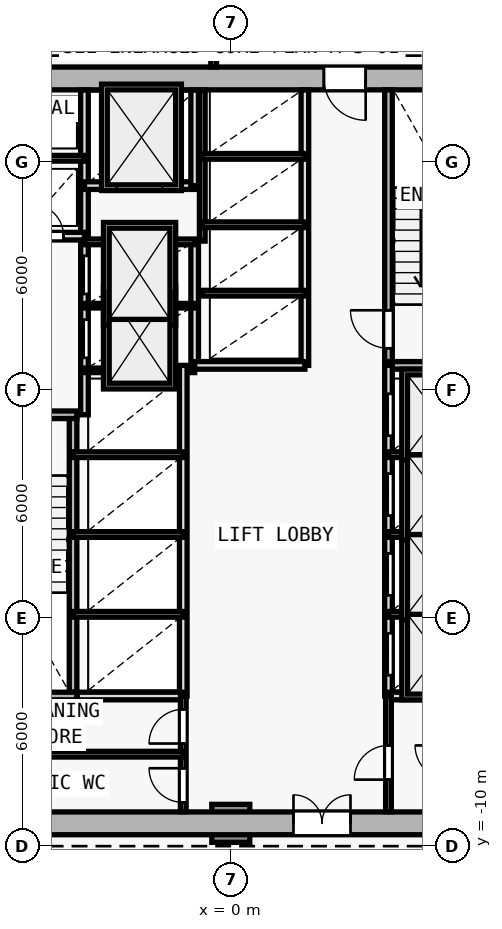
"""IFC4 building model, lengths in metres.
Left out: names, types, materials, properties, quantities, classifications, styles, units other than length and angle.
Written with IfcOpenShell. Run it as: python <this file> out.ifc"""

import sys

from ifc_helpers import new_model, si_unit, direction, frame, frame_2d, origin, origin_2d, place, context, subcontext, project, spatial, rectangle, extrude, element, fill, save


model = new_model("IFC4")
c1 = context("Model", 3, precision=1e-05, world=origin(), true_north=direction((0.0, 1.0)))
c2 = subcontext(c1, "Body", "Model", "MODEL_VIEW")
j1 = project(units=[si_unit("LENGTHUNIT", "METRE"), si_unit("PLANEANGLEUNIT", "RADIAN")], contexts=[c1])
p1 = place(None, origin())
s1 = spatial("IfcSite", under=j1, at=p1, CompositionType="ELEMENT")
p2 = place(p1, origin())
s2 = spatial("IfcBuilding", under=s1, at=p2, CompositionType="ELEMENT")
p3 = place(p2, frame((0.0, 0.0, 9.2)))
s3 = spatial("IfcBuildingStorey", under=s2, at=p3, CompositionType="ELEMENT", Elevation=9.2)
p4 = place(p3, frame((0.0, -9.4, 0.0), z_axis=(0.0, 0.0, 1.0), x_axis=(1.0, 0.0, 0.0)))
e1 = element("IfcColumn", 1, at=p4, inside=s3, PredefinedType="COLUMN", context=c2, shape_type="SweptSolid", body=[
    extrude(rectangle(XDim=1.0, YDim=1.0, at=origin_2d()), origin(), (0.0, 0.0, 1.0), 4.2),
])
p5 = place(p3, frame((-8.0, -9.4, 0.0), z_axis=(0.0, 0.0, 1.0), x_axis=(1.0, 0.0, 0.0)))
e2 = element("IfcWall", 2, at=p5, inside=s3, PredefinedType="SHEAR", context=c2, shape_type="SweptSolid", body=[
    extrude(rectangle(XDim=16.0, YDim=0.6, at=frame_2d((8.0, 0.0))), origin(), (0.0, 0.0, 1.0), 3.92),
])
p6 = place(p5, frame((9.65, 0.0, 0.0)))
e3 = element("IfcOpeningElement", 3, at=p6, cuts=e2, PredefinedType="OPENING", context=c2, shape_type="SweptSolid", body=[
    extrude(rectangle(XDim=1.5, YDim=2.2, at=frame_2d((0.75, 1.1))), frame((0.0, 0.31, 0.0), z_axis=(0.0, -1.0, 0.0), x_axis=(1.0, 0.0, 0.0)), (0.0, 0.0, 1.0), 0.62),
])
p7 = place(p3, frame((8.0, 10.2, 0.0), z_axis=(0.0, 0.0, 1.0), x_axis=(-1.0, 0.0, 0.0)))
e4 = element("IfcWall", 4, at=p7, inside=s3, PredefinedType="SHEAR", context=c2, shape_type="SweptSolid", body=[
    extrude(rectangle(XDim=16.0, YDim=0.6, at=frame_2d((8.0, 0.0))), origin(), (0.0, 0.0, 1.0), 3.92),
])
p8 = place(p7, frame((4.45, 0.0, 0.0)))
e5 = element("IfcOpeningElement", 5, at=p8, cuts=e4, PredefinedType="OPENING", context=c2, shape_type="SweptSolid", body=[
    extrude(rectangle(XDim=1.1, YDim=2.15, at=frame_2d((0.55, 1.075))), frame((0.0, 0.31, 0.0), z_axis=(0.0, -1.0, 0.0), x_axis=(1.0, 0.0, 0.0)), (0.0, 0.0, 1.0), 0.62),
])
p9 = place(p3, frame((-7.4, 1.35, 0.0), z_axis=(0.0, 0.0, 1.0), x_axis=(1.0, 0.0, 0.0)))
e6 = element("IfcWall", 6, at=p9, inside=s3, PredefinedType="SOLIDWALL", context=c2, shape_type="SweptSolid", body=[
    extrude(rectangle(XDim=3.35, YDim=0.2, at=frame_2d((1.675, 0.0))), origin(), (0.0, 0.0, 1.0), 3.92),
])
p10 = place(p9, frame((0.65, 0.0, 0.0)))
e7 = element("IfcOpeningElement", 7, at=p10, cuts=e6, PredefinedType="OPENING", context=c2, shape_type="SweptSolid", body=[
    extrude(rectangle(XDim=1.0, YDim=2.15, at=frame_2d((0.5, 1.075))), frame((0.0, 0.11, 0.0), z_axis=(0.0, -1.0, 0.0), x_axis=(1.0, 0.0, 0.0)), (0.0, 0.0, 1.0), 0.22),
])
p11 = place(p3, frame((-4.15, -5.95, 0.0), z_axis=(0.0, 0.0, 1.0), x_axis=(0.0, 1.0, 0.0)))
e8 = element("IfcWall", 8, at=p11, inside=s3, PredefinedType="SOLIDWALL", context=c2, shape_type="SweptSolid", body=[
    extrude(rectangle(XDim=7.2, YDim=0.2, at=frame_2d((3.6, 0.0))), origin(), (0.0, 0.0, 1.0), 3.92),
])
p12 = place(p3, frame((-3.85, 1.35, 0.0), z_axis=(0.0, 0.0, 1.0), x_axis=(0.0, 1.0, 0.0)))
e9 = element("IfcWall", 9, at=p12, inside=s3, PredefinedType="SOLIDWALL", context=c2, shape_type="SweptSolid", body=[
    extrude(rectangle(XDim=8.545, YDim=0.2, at=frame_2d((4.272, 0.0))), origin(), (0.0, 0.0, 1.0), 3.92),
])
p13 = place(p12, frame((1.5, 0.0, 0.0)))
e10 = element("IfcOpeningElement", 10, at=p13, cuts=e9, PredefinedType="OPENING", context=c2, shape_type="SweptSolid", body=[
    extrude(rectangle(XDim=1.0, YDim=2.15, at=frame_2d((0.5, 1.075))), frame((0.0, 0.11, 0.0), z_axis=(0.0, -1.0, 0.0), x_axis=(1.0, 0.0, 0.0)), (0.0, 0.0, 1.0), 0.22),
])
p14 = place(p12, frame((3.18, 0.0, 0.0)))
e11 = element("IfcOpeningElement", 11, at=p14, cuts=e9, PredefinedType="OPENING", context=c2, shape_type="SweptSolid", body=[
    extrude(rectangle(XDim=1.0, YDim=2.15, at=frame_2d((0.5, 1.075))), frame((0.0, 0.11, 0.0), z_axis=(0.0, -1.0, 0.0), x_axis=(1.0, 0.0, 0.0)), (0.0, 0.0, 1.0), 0.22),
])
p15 = place(p3, frame((-7.395, 6.05, 0.0), z_axis=(0.0, 0.0, 1.0), x_axis=(1.0, 0.0, 0.0)))
e12 = element("IfcWall", 12, at=p15, inside=s3, PredefinedType="SOLIDWALL", context=c2, shape_type="SweptSolid", body=[
    extrude(rectangle(XDim=3.545, YDim=0.2, at=frame_2d((1.772, 0.0))), origin(), (0.0, 0.0, 1.0), 3.92),
])
p16 = place(p15, frame((0.345, 0.0, 0.0)))
e13 = element("IfcOpeningElement", 13, at=p16, cuts=e12, PredefinedType="OPENING", context=c2, shape_type="SweptSolid", body=[
    extrude(rectangle(XDim=0.85, YDim=2.1, at=frame_2d((0.425, 1.05))), frame((0.0, 0.11, 0.0), z_axis=(0.0, -1.0, 0.0), x_axis=(1.0, 0.0, 0.0)), (0.0, 0.0, 1.0), 0.22),
])
p17 = place(p15, frame((2.145, 0.0, 0.0)))
e14 = element("IfcOpeningElement", 14, at=p17, cuts=e12, PredefinedType="OPENING", context=c2, shape_type="SweptSolid", body=[
    extrude(rectangle(XDim=0.85, YDim=2.1, at=frame_2d((0.425, 1.05))), frame((0.0, 0.11, 0.0), z_axis=(0.0, -1.0, 0.0), x_axis=(1.0, 0.0, 0.0)), (0.0, 0.0, 1.0), 0.22),
])
p18 = place(p3, frame((-7.395, 8.1, 0.0), z_axis=(0.0, 0.0, 1.0), x_axis=(1.0, 0.0, 0.0)))
e15 = element("IfcWall", 15, at=p18, inside=s3, PredefinedType="PARTITIONING", context=c2, shape_type="SweptSolid", body=[
    extrude(rectangle(XDim=3.545, YDim=0.15, at=frame_2d((1.772, 0.0))), origin(), (0.0, 0.0, 1.0), 3.92),
])
p19 = place(p3, frame((4.15, 2.75, 0.0), z_axis=(0.0, 0.0, 1.0), x_axis=(0.0, 1.0, 0.0)))
e16 = element("IfcWall", 16, at=p19, inside=s3, PredefinedType="SOLIDWALL", context=c2, shape_type="SweptSolid", body=[
    extrude(rectangle(XDim=7.15, YDim=0.2, at=frame_2d((3.575, 0.0))), origin(), (0.0, 0.0, 1.0), 3.92),
])
p20 = place(p19, frame((0.35, 0.0, 0.0)))
e17 = element("IfcOpeningElement", 17, at=p20, cuts=e16, PredefinedType="OPENING", context=c2, shape_type="SweptSolid", body=[
    extrude(rectangle(XDim=1.0, YDim=2.15, at=frame_2d((0.5, 1.075))), frame((0.0, 0.11, 0.0), z_axis=(0.0, -1.0, 0.0), x_axis=(1.0, 0.0, 0.0)), (0.0, 0.0, 1.0), 0.22),
])
p21 = place(p3, frame((4.05, 2.65, 0.0), z_axis=(0.0, 0.0, 1.0), x_axis=(1.0, 0.0, 0.0)))
e18 = element("IfcWall", 18, at=p21, inside=s3, PredefinedType="SOLIDWALL", context=c2, shape_type="SweptSolid", body=[
    extrude(rectangle(XDim=3.35, YDim=0.2, at=frame_2d((1.675, 0.0))), origin(), (0.0, 0.0, 1.0), 3.92),
])
p22 = place(p3, frame((-0.95, 2.65, 0.0), z_axis=(0.0, 0.0, 1.0), x_axis=(0.0, 1.0, 0.0)))
e19 = element("IfcWall", 19, at=p22, inside=s3, PredefinedType="SOLIDWALL", context=c2, shape_type="SweptSolid", body=[
    extrude(rectangle(XDim=3.27, YDim=0.2, at=frame_2d((1.635, 0.0))), origin(), (0.0, 0.0, 1.0), 3.92),
])
for number, where, z_axis, x_axis in (
    (20, (-3.85, 2.52, 0.0), (0.0, 0.0, 1.0), (1.0, 0.0, 0.0)),
    (21, (-3.85, 4.22, 0.0), (0.0, 0.0, 1.0), (1.0, 0.0, 0.0)),
):
    element("IfcWall", number, at=place(p3, frame(where, z_axis=z_axis, x_axis=x_axis)), inside=s3, PredefinedType="PARTITIONING", context=c2, shape_type="SweptSolid", body=[
        extrude(rectangle(XDim=2.9, YDim=0.12, at=frame_2d((1.45, 0.0))), origin(), (0.0, 0.0, 1.0), 3.92),
    ])
p23 = place(p3, frame((-3.85, 5.9, 0.0), z_axis=(0.0, 0.0, 1.0), x_axis=(1.0, 0.0, 0.0)))
e22 = element("IfcWall", 22, at=p23, inside=s3, PredefinedType="PARTITIONING", context=c2, shape_type="SweptSolid", body=[
    extrude(rectangle(XDim=2.9, YDim=0.15, at=frame_2d((1.45, 0.0))), origin(), (0.0, 0.0, 1.0), 3.92),
])
p24 = place(p3, frame((-3.85, 7.38, 0.0), z_axis=(0.0, 0.0, 1.0), x_axis=(1.0, 0.0, 0.0)))
e23 = element("IfcWall", 23, at=p24, inside=s3, PredefinedType="SOLIDWALL", context=c2, shape_type="SweptSolid", body=[
    extrude(rectangle(XDim=2.9, YDim=0.2, at=frame_2d((1.45, 0.0))), origin(), (0.0, 0.0, 1.0), 3.92),
])
p25 = place(p24, frame((0.85, 0.0, 0.0)))
e24 = element("IfcOpeningElement", 24, at=p25, cuts=e23, PredefinedType="OPENING", context=c2, shape_type="SweptSolid", body=[
    extrude(rectangle(XDim=1.2, YDim=2.2, at=frame_2d((0.6, 1.1))), frame((0.0, 0.11, 0.0), z_axis=(0.0, -1.0, 0.0), x_axis=(1.0, 0.0, 0.0)), (0.0, 0.0, 1.0), 0.22),
])
p26 = place(p3, frame((-0.95, 7.38, 0.0), z_axis=(0.0, 0.0, 1.0), x_axis=(0.0, 1.0, 0.0)))
e25 = element("IfcWall", 25, at=p26, inside=s3, PredefinedType="SOLIDWALL", context=c2, shape_type="SweptSolid", body=[
    extrude(rectangle(XDim=2.515, YDim=0.2, at=frame_2d((1.258, 0.0))), origin(), (0.0, 0.0, 1.0), 3.92),
])
p27 = place(p3, frame((4.15, -6.05, 0.0), z_axis=(0.0, 0.0, 1.0), x_axis=(0.0, 1.0, 0.0)))
e26 = element("IfcWall", 26, at=p27, inside=s3, PredefinedType="SOLIDWALL", context=c2, shape_type="SweptSolid", body=[
    extrude(rectangle(XDim=8.7, YDim=0.2, at=frame_2d((4.35, 0.0))), origin(), (0.0, 0.0, 1.0), 3.92),
])
p28 = place(p27, frame((0.55, 0.0, 0.0)))
e27 = element("IfcOpeningElement", 27, at=p28, cuts=e26, PredefinedType="OPENING", context=c2, shape_type="SweptSolid", body=[
    extrude(rectangle(XDim=1.1, YDim=2.15, at=frame_2d((0.55, 1.075))), frame((0.0, 0.11, 0.0), z_axis=(0.0, -1.0, 0.0), x_axis=(1.0, 0.0, 0.0)), (0.0, 0.0, 1.0), 0.22),
])
p29 = place(p27, frame((2.65, 0.0, 0.0)))
e28 = element("IfcOpeningElement", 28, at=p29, cuts=e26, PredefinedType="OPENING", context=c2, shape_type="SweptSolid", body=[
    extrude(rectangle(XDim=1.1, YDim=2.15, at=frame_2d((0.55, 1.075))), frame((0.0, 0.11, 0.0), z_axis=(0.0, -1.0, 0.0), x_axis=(1.0, 0.0, 0.0)), (0.0, 0.0, 1.0), 0.22),
])
p30 = place(p27, frame((4.75, 0.0, 0.0)))
e29 = element("IfcOpeningElement", 29, at=p30, cuts=e26, PredefinedType="OPENING", context=c2, shape_type="SweptSolid", body=[
    extrude(rectangle(XDim=1.1, YDim=2.15, at=frame_2d((0.55, 1.075))), frame((0.0, 0.11, 0.0), z_axis=(0.0, -1.0, 0.0), x_axis=(1.0, 0.0, 0.0)), (0.0, 0.0, 1.0), 0.22),
])
p31 = place(p27, frame((6.85, 0.0, 0.0)))
e30 = element("IfcOpeningElement", 30, at=p31, cuts=e26, PredefinedType="OPENING", context=c2, shape_type="SweptSolid", body=[
    extrude(rectangle(XDim=1.1, YDim=2.15, at=frame_2d((0.55, 1.075))), frame((0.0, 0.11, 0.0), z_axis=(0.0, -1.0, 0.0), x_axis=(1.0, 0.0, 0.0)), (0.0, 0.0, 1.0), 0.22),
])
for number, where, z_axis, x_axis in (
    (31, (4.15, -3.9, 0.0), (0.0, 0.0, 1.0), (1.0, 0.0, 0.0)),
    (32, (4.15, -1.8, 0.0), (0.0, 0.0, 1.0), (1.0, 0.0, 0.0)),
    (33, (4.15, 0.3, 0.0), (0.0, 0.0, 1.0), (1.0, 0.0, 0.0)),
):
    element("IfcWall", number, at=place(p3, frame(where, z_axis=z_axis, x_axis=x_axis)), inside=s3, PredefinedType="PARTITIONING", context=c2, shape_type="SweptSolid", body=[
        extrude(rectangle(XDim=2.6, YDim=0.15, at=frame_2d((1.3, 0.0))), origin(), (0.0, 0.0, 1.0), 3.92),
    ])
p32 = place(p3, frame((-1.25, -6.05, 0.0), z_axis=(0.0, 0.0, 1.0), x_axis=(0.0, 1.0, 0.0)))
e34 = element("IfcWall", 34, at=p32, inside=s3, PredefinedType="SOLIDWALL", context=c2, shape_type="SweptSolid", body=[
    extrude(rectangle(XDim=8.7, YDim=0.2, at=frame_2d((4.35, 0.0))), origin(), (0.0, 0.0, 1.0), 3.92),
])
for number, where, z_axis, x_axis in (
    (35, (-4.15, -3.9, 0.0), (0.0, 0.0, 1.0), (1.0, 0.0, 0.0)),
    (36, (-4.15, -1.8, 0.0), (0.0, 0.0, 1.0), (1.0, 0.0, 0.0)),
    (37, (-4.15, 0.3, 0.0), (0.0, 0.0, 1.0), (1.0, 0.0, 0.0)),
):
    element("IfcWall", number, at=place(p3, frame(where, z_axis=z_axis, x_axis=x_axis)), inside=s3, PredefinedType="PARTITIONING", context=c2, shape_type="SweptSolid", body=[
        extrude(rectangle(XDim=2.9, YDim=0.15, at=frame_2d((1.45, 0.0))), origin(), (0.0, 0.0, 1.0), 3.92),
    ])
p33 = place(p3, frame((1.95, 2.65, 0.0), z_axis=(0.0, 0.0, 1.0), x_axis=(0.0, 1.0, 0.0)))
e38 = element("IfcWall", 38, at=p33, inside=s3, PredefinedType="SOLIDWALL", context=c2, shape_type="SweptSolid", body=[
    extrude(rectangle(XDim=7.245, YDim=0.2, at=frame_2d((3.623, 0.0))), origin(), (0.0, 0.0, 1.0), 3.92),
])
p34 = place(p3, frame((-0.95, 2.65, 0.0), z_axis=(0.0, 0.0, 1.0), x_axis=(1.0, 0.0, 0.0)))
e39 = element("IfcWall", 39, at=p34, inside=s3, PredefinedType="SOLIDWALL", context=c2, shape_type="SweptSolid", body=[
    extrude(rectangle(XDim=2.9, YDim=0.2, at=frame_2d((1.45, 0.0))), origin(), (0.0, 0.0, 1.0), 3.92),
])
p35 = place(p3, frame((-0.75, 5.92, 0.0), z_axis=(0.0, 0.0, 1.0), x_axis=(0.0, 1.0, 0.0)))
e40 = element("IfcWall", 40, at=p35, inside=s3, PredefinedType="PARTITIONING", context=c2, shape_type="SweptSolid", body=[
    extrude(rectangle(XDim=3.975, YDim=0.15, at=frame_2d((1.988, 0.0))), origin(), (0.0, 0.0, 1.0), 3.92),
])
for number, where, z_axis, x_axis in (
    (41, (-0.75, 4.55, 0.0), (0.0, 0.0, 1.0), (1.0, 0.0, 0.0)),
    (42, (-0.75, 6.35, 0.0), (0.0, 0.0, 1.0), (1.0, 0.0, 0.0)),
    (43, (-0.75, 8.15, 0.0), (0.0, 0.0, 1.0), (1.0, 0.0, 0.0)),
):
    element("IfcWall", number, at=place(p3, frame(where, z_axis=z_axis, x_axis=x_axis)), inside=s3, PredefinedType="PARTITIONING", context=c2, shape_type="SweptSolid", body=[
        extrude(rectangle(XDim=2.7, YDim=0.15, at=frame_2d((1.35, 0.0))), origin(), (0.0, 0.0, 1.0), 3.92),
    ])
p36 = place(p3, frame((-7.4, -6.05, 0.0), z_axis=(0.0, 0.0, 1.0), x_axis=(1.0, 0.0, 0.0)))
e44 = element("IfcWall", 44, at=p36, inside=s3, PredefinedType="SOLIDWALL", context=c2, shape_type="SweptSolid", body=[
    extrude(rectangle(XDim=3.35, YDim=0.2, at=frame_2d((1.675, 0.0))), origin(), (0.0, 0.0, 1.0), 3.92),
])
p37 = place(p3, frame((-4.04, -6.05, 0.0), z_axis=(0.0, 0.0, 1.0), x_axis=(1.0, 0.0, 0.0)))
e45 = element("IfcWall", 45, at=p37, inside=s3, PredefinedType="SOLIDWALL", context=c2, shape_type="SweptSolid", body=[
    extrude(rectangle(XDim=2.79, YDim=0.2, at=frame_2d((1.395, 0.0))), origin(), (0.0, 0.0, 1.0), 3.92),
])
p38 = place(p3, frame((4.15, -6.05, 0.0), z_axis=(0.0, 0.0, 1.0), x_axis=(1.0, 0.0, 0.0)))
e46 = element("IfcWall", 46, at=p38, inside=s3, PredefinedType="SOLIDWALL", context=c2, shape_type="SweptSolid", body=[
    extrude(rectangle(XDim=3.245, YDim=0.2, at=frame_2d((1.623, 0.0))), origin(), (0.0, 0.0, 1.0), 3.92),
])
p39 = place(p3, frame((-1.25, -9.095, 0.0), z_axis=(0.0, 0.0, 1.0), x_axis=(0.0, 1.0, 0.0)))
e47 = element("IfcWall", 47, at=p39, inside=s3, PredefinedType="PARTITIONING", context=c2, shape_type="SweptSolid", body=[
    extrude(rectangle(XDim=3.045, YDim=0.15, at=frame_2d((1.522, 0.0))), origin(), (0.0, 0.0, 1.0), 3.92),
])
p40 = place(p39, frame((1.795, 0.0, 0.0)))
e48 = element("IfcOpeningElement", 48, at=p40, cuts=e47, PredefinedType="OPENING", context=c2, shape_type="SweptSolid", body=[
    extrude(rectangle(XDim=0.9, YDim=2.1, at=frame_2d((0.45, 1.05))), frame((0.0, 0.085, 0.0), z_axis=(0.0, -1.0, 0.0), x_axis=(1.0, 0.0, 0.0)), (0.0, 0.0, 1.0), 0.17),
])
p41 = place(p39, frame((0.245, 0.0, 0.0)))
e49 = element("IfcOpeningElement", 49, at=p41, cuts=e47, PredefinedType="OPENING", context=c2, shape_type="SweptSolid", body=[
    extrude(rectangle(XDim=0.9, YDim=2.1, at=frame_2d((0.45, 1.05))), frame((0.0, 0.085, 0.0), z_axis=(0.0, -1.0, 0.0), x_axis=(1.0, 0.0, 0.0)), (0.0, 0.0, 1.0), 0.17),
])
p42 = place(p3, frame((4.15, -9.095, 0.0), z_axis=(0.0, 0.0, 1.0), x_axis=(0.0, 1.0, 0.0)))
e50 = element("IfcWall", 50, at=p42, inside=s3, PredefinedType="PARTITIONING", context=c2, shape_type="SweptSolid", body=[
    extrude(rectangle(XDim=3.045, YDim=0.15, at=frame_2d((1.522, 0.0))), origin(), (0.0, 0.0, 1.0), 3.92),
])
p43 = place(p42, frame((0.845, 0.0, 0.0)))
e51 = element("IfcOpeningElement", 51, at=p43, cuts=e50, PredefinedType="OPENING", context=c2, shape_type="SweptSolid", body=[
    extrude(rectangle(XDim=0.9, YDim=2.1, at=frame_2d((0.45, 1.05))), frame((0.0, 0.085, 0.0), z_axis=(0.0, -1.0, 0.0), x_axis=(1.0, 0.0, 0.0)), (0.0, 0.0, 1.0), 0.17),
])
p44 = place(p3, frame((-7.395, -7.58, 0.0), z_axis=(0.0, 0.0, 1.0), x_axis=(1.0, 0.0, 0.0)))
e52 = element("IfcWall", 52, at=p44, inside=s3, PredefinedType="PARTITIONING", context=c2, shape_type="SweptSolid", body=[
    extrude(rectangle(XDim=6.145, YDim=0.15, at=frame_2d((3.073, 0.0))), origin(), (0.0, 0.0, 1.0), 3.92),
])
p45 = place(p3, frame((-0.45, 10.5, 0.0), z_axis=(0.0, 0.0, 1.0), x_axis=(0.0, 1.0, 0.0)))
e53 = element("IfcWall", 53, at=p45, inside=s3, PredefinedType="PARTITIONING", context=c2, shape_type="SweptSolid", body=[
    extrude(rectangle(XDim=4.75, YDim=0.15, at=frame_2d((2.375, 0.0))), origin(), (0.0, 0.0, 1.0), 3.92),
])
p46 = place(p6, origin())
e54 = element("IfcDoor", 54, at=p46, inside=s3, OperationType="DOUBLE_DOOR_SINGLE_SWING", PredefinedType="DOOR", context=c2, shape_type="SweptSolid", body=[
    extrude(rectangle(XDim=1.5, YDim=2.2, at=frame_2d((0.75, 1.1))), frame((0.0, 0.025, 0.0), z_axis=(0.0, -1.0, 0.0), x_axis=(1.0, 0.0, 0.0)), (0.0, 0.0, 1.0), 0.05),
])
fill(e3, e54)
p47 = place(p8, origin())
e55 = element("IfcDoor", 55, at=p47, inside=s3, OperationType="SINGLE_SWING_LEFT", PredefinedType="DOOR", context=c2, shape_type="SweptSolid", body=[
    extrude(rectangle(XDim=1.1, YDim=2.15, at=frame_2d((0.55, 1.075))), frame((0.0, 0.025, 0.0), z_axis=(0.0, -1.0, 0.0), x_axis=(1.0, 0.0, 0.0)), (0.0, 0.0, 1.0), 0.05),
])
fill(e5, e55)
p48 = place(p17, origin())
e56 = element("IfcDoor", 56, at=p48, inside=s3, OperationType="SINGLE_SWING_LEFT", PredefinedType="DOOR", context=c2, shape_type="SweptSolid", body=[
    extrude(rectangle(XDim=0.85, YDim=2.1, at=frame_2d((0.425, 1.05))), frame((0.0, 0.025, 0.0), z_axis=(0.0, -1.0, 0.0), x_axis=(1.0, 0.0, 0.0)), (0.0, 0.0, 1.0), 0.05),
])
fill(e14, e56)
p49 = place(p20, origin())
e57 = element("IfcDoor", 57, at=p49, inside=s3, OperationType="SINGLE_SWING_RIGHT", PredefinedType="DOOR", context=c2, shape_type="SweptSolid", body=[
    extrude(rectangle(XDim=1.0, YDim=2.15, at=frame_2d((0.5, 1.075))), frame((0.0, 0.025, 0.0), z_axis=(0.0, -1.0, 0.0), x_axis=(1.0, 0.0, 0.0)), (0.0, 0.0, 1.0), 0.05),
])
fill(e17, e57)
p50 = place(p25, origin())
e58 = element("IfcDoor", 58, at=p50, inside=s3, OperationType="DOUBLE_DOOR_SLIDING", PredefinedType="DOOR", context=c2, shape_type="SweptSolid", body=[
    extrude(rectangle(XDim=1.2, YDim=2.2, at=frame_2d((0.6, 1.1))), frame((0.0, 0.025, 0.0), z_axis=(0.0, -1.0, 0.0), x_axis=(1.0, 0.0, 0.0)), (0.0, 0.0, 1.0), 0.05),
])
fill(e24, e58)
p51 = place(p28, origin())
e59 = element("IfcDoor", 59, at=p51, inside=s3, OperationType="DOUBLE_DOOR_SLIDING", PredefinedType="DOOR", context=c2, shape_type="SweptSolid", body=[
    extrude(rectangle(XDim=1.1, YDim=2.15, at=frame_2d((0.55, 1.075))), frame((0.0, 0.025, 0.0), z_axis=(0.0, -1.0, 0.0), x_axis=(1.0, 0.0, 0.0)), (0.0, 0.0, 1.0), 0.05),
])
fill(e27, e59)
p52 = place(p29, origin())
e60 = element("IfcDoor", 60, at=p52, inside=s3, OperationType="DOUBLE_DOOR_SLIDING", PredefinedType="DOOR", context=c2, shape_type="SweptSolid", body=[
    extrude(rectangle(XDim=1.1, YDim=2.15, at=frame_2d((0.55, 1.075))), frame((0.0, 0.025, 0.0), z_axis=(0.0, -1.0, 0.0), x_axis=(1.0, 0.0, 0.0)), (0.0, 0.0, 1.0), 0.05),
])
fill(e28, e60)
p53 = place(p30, origin())
e61 = element("IfcDoor", 61, at=p53, inside=s3, OperationType="DOUBLE_DOOR_SLIDING", PredefinedType="DOOR", context=c2, shape_type="SweptSolid", body=[
    extrude(rectangle(XDim=1.1, YDim=2.15, at=frame_2d((0.55, 1.075))), frame((0.0, 0.025, 0.0), z_axis=(0.0, -1.0, 0.0), x_axis=(1.0, 0.0, 0.0)), (0.0, 0.0, 1.0), 0.05),
])
fill(e29, e61)
p54 = place(p31, origin())
e62 = element("IfcDoor", 62, at=p54, inside=s3, OperationType="DOUBLE_DOOR_SLIDING", PredefinedType="DOOR", context=c2, shape_type="SweptSolid", body=[
    extrude(rectangle(XDim=1.1, YDim=2.15, at=frame_2d((0.55, 1.075))), frame((0.0, 0.025, 0.0), z_axis=(0.0, -1.0, 0.0), x_axis=(1.0, 0.0, 0.0)), (0.0, 0.0, 1.0), 0.05),
])
fill(e30, e62)
p55 = place(p13, origin())
e63 = element("IfcDoor", 63, at=p55, inside=s3, OperationType="DOUBLE_DOOR_SLIDING", PredefinedType="DOOR", context=c2, shape_type="SweptSolid", body=[
    extrude(rectangle(XDim=1.0, YDim=2.15, at=frame_2d((0.5, 1.075))), frame((0.0, 0.025, 0.0), z_axis=(0.0, -1.0, 0.0), x_axis=(1.0, 0.0, 0.0)), (0.0, 0.0, 1.0), 0.05),
])
fill(e10, e63)
p56 = place(p14, origin())
e64 = element("IfcDoor", 64, at=p56, inside=s3, OperationType="DOUBLE_DOOR_SLIDING", PredefinedType="DOOR", context=c2, shape_type="SweptSolid", body=[
    extrude(rectangle(XDim=1.0, YDim=2.15, at=frame_2d((0.5, 1.075))), frame((0.0, 0.025, 0.0), z_axis=(0.0, -1.0, 0.0), x_axis=(1.0, 0.0, 0.0)), (0.0, 0.0, 1.0), 0.05),
])
fill(e11, e64)
p57 = place(p40, origin())
e65 = element("IfcDoor", 65, at=p57, inside=s3, OperationType="SINGLE_SWING_LEFT", PredefinedType="DOOR", context=c2, shape_type="SweptSolid", body=[
    extrude(rectangle(XDim=0.9, YDim=2.1, at=frame_2d((0.45, 1.05))), frame((0.0, 0.025, 0.0), z_axis=(0.0, -1.0, 0.0), x_axis=(1.0, 0.0, 0.0)), (0.0, 0.0, 1.0), 0.05),
])
fill(e48, e65)
p58 = place(p41, origin())
e66 = element("IfcDoor", 66, at=p58, inside=s3, OperationType="SINGLE_SWING_RIGHT", PredefinedType="DOOR", context=c2, shape_type="SweptSolid", body=[
    extrude(rectangle(XDim=0.9, YDim=2.1, at=frame_2d((0.45, 1.05))), frame((0.0, 0.025, 0.0), z_axis=(0.0, -1.0, 0.0), x_axis=(1.0, 0.0, 0.0)), (0.0, 0.0, 1.0), 0.05),
])
fill(e49, e66)
p59 = place(p43, origin())
e67 = element("IfcDoor", 67, at=p59, inside=s3, OperationType="SINGLE_SWING_LEFT", PredefinedType="DOOR", context=c2, shape_type="SweptSolid", body=[
    extrude(rectangle(XDim=0.9, YDim=2.1, at=frame_2d((0.45, 1.05))), frame((0.0, 0.025, 0.0), z_axis=(0.0, -1.0, 0.0), x_axis=(1.0, 0.0, 0.0)), (0.0, 0.0, 1.0), 0.05),
])
fill(e51, e67)
save(model, sys.argv[1])
